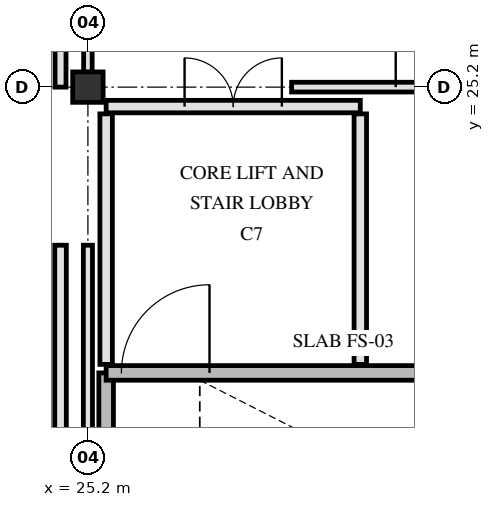
"""IFC4 building model, lengths in metres.
Left out: names, types, materials, properties, quantities, classifications, styles, units other than length and angle.
Written with IfcOpenShell. Run it as: python <this file> out.ifc"""

import sys

from ifc_helpers import new_model, si_unit, direction, frame, frame_2d, origin, origin_2d, place, context, subcontext, project, spatial, rectangle, extrude, element, fill, save


model = new_model("IFC4")
c1 = context("Model", 3, precision=1e-05, world=origin(), true_north=direction((0.0, 1.0)))
c2 = subcontext(c1, "Body", "Model", "MODEL_VIEW")
j1 = project(units=[si_unit("LENGTHUNIT", "METRE"), si_unit("PLANEANGLEUNIT", "RADIAN")], contexts=[c1])
p1 = place(None, origin())
s1 = spatial("IfcSite", under=j1, at=p1, CompositionType="ELEMENT")
p2 = place(p1, origin())
s2 = spatial("IfcBuilding", under=s1, at=p2, CompositionType="ELEMENT")
p3 = place(p2, frame((0.0, 0.0, 4.8)))
s3 = spatial("IfcBuildingStorey", under=s2, at=p3, CompositionType="ELEMENT", Elevation=4.8)
p4 = place(p3, frame((25.2, 25.2, 0.0), z_axis=(0.0, 0.0, 1.0), x_axis=(1.0, 0.0, 0.0)))
e1 = element("IfcColumn", 1, at=p4, inside=s3, PredefinedType="COLUMN", context=c2, shape_type="SweptSolid", body=[
    extrude(rectangle(XDim=0.5, YDim=0.5, at=origin_2d()), origin(), (0.0, 0.0, 1.0), 4.5),
])
p5 = place(p3, frame((25.5, 17.18, 0.0), z_axis=(0.0, 0.0, 1.0), x_axis=(0.0, 1.0, 0.0)))
e2 = element("IfcWall", 2, at=p5, inside=s3, PredefinedType="SHEAR", context=c2, shape_type="SweptSolid", body=[
    extrude(rectangle(XDim=3.32, YDim=0.24, at=frame_2d((1.66, 0.0))), origin(), (0.0, 0.0, 1.0), 4.15),
])
p6 = place(p3, frame((25.5, 20.5, 0.0), z_axis=(0.0, 0.0, 1.0), x_axis=(1.0, 0.0, 0.0)))
e3 = element("IfcWall", 3, at=p6, inside=s3, PredefinedType="SHEAR", context=c2, shape_type="SweptSolid", body=[
    extrude(rectangle(XDim=7.82, YDim=0.24, at=frame_2d((3.91, 0.0))), origin(), (0.0, 0.0, 1.0), 4.15),
])
p7 = place(p6, frame((0.25, 0.0, 0.0)))
e4 = element("IfcOpeningElement", 4, at=p7, cuts=e3, PredefinedType="OPENING", context=c2, shape_type="SweptSolid", body=[
    extrude(rectangle(XDim=1.45, YDim=2.2, at=frame_2d((0.725, 1.1))), frame((0.0, 0.13, 0.0), z_axis=(0.0, -1.0, 0.0), x_axis=(1.0, 0.0, 0.0)), (0.0, 0.0, 1.0), 0.26),
])
p8 = place(p3, frame((29.68, 20.64, 0.0), z_axis=(0.0, 0.0, 1.0), x_axis=(0.0, 1.0, 0.0)))
e5 = element("IfcWall", 5, at=p8, inside=s3, PredefinedType="PARTITIONING", context=c2, shape_type="SweptSolid", body=[
    extrude(rectangle(XDim=4.12, YDim=0.205, at=frame_2d((2.06, 0.0))), origin(), (0.0, 0.0, 1.0), 4.14),
])
p9 = place(p3, frame((25.5, 20.64, 0.0), z_axis=(0.0, 0.0, 1.0), x_axis=(0.0, 1.0, 0.0)))
e6 = element("IfcWall", 6, at=p9, inside=s3, PredefinedType="PARTITIONING", context=c2, shape_type="SweptSolid", body=[
    extrude(rectangle(XDim=4.12, YDim=0.205, at=frame_2d((2.06, 0.0))), origin(), (0.0, 0.0, 1.0), 3.59),
])
p10 = place(p3, frame((25.5, 24.88, 0.0), z_axis=(0.0, 0.0, 1.0), x_axis=(1.0, 0.0, 0.0)))
e7 = element("IfcWall", 7, at=p10, inside=s3, PredefinedType="PARTITIONING", context=c2, shape_type="SweptSolid", body=[
    extrude(rectangle(XDim=4.18, YDim=0.205, at=frame_2d((2.09, 0.0))), origin(), (0.0, 0.0, 1.0), 3.54),
])
p11 = place(p10, frame((1.29, 0.0, 0.0)))
e8 = element("IfcOpeningElement", 8, at=p11, cuts=e7, PredefinedType="OPENING", context=c2, shape_type="SweptSolid", body=[
    extrude(rectangle(XDim=1.6, YDim=2.25, at=frame_2d((0.8, 1.125))), frame((0.0, 0.113, 0.0), z_axis=(0.0, -1.0, 0.0), x_axis=(1.0, 0.0, 0.0)), (0.0, 0.0, 1.0), 0.225),
])
p12 = place(p3, frame((28.55, 25.2, 0.0), z_axis=(0.0, 0.0, 1.0), x_axis=(1.0, 0.0, 0.0)))
e9 = element("IfcWall", 9, at=p12, inside=s3, PredefinedType="PARTITIONING", context=c2, shape_type="SweptSolid", body=[
    extrude(rectangle(XDim=4.805, YDim=0.16, at=frame_2d((2.402, 0.0))), origin(), (0.0, 0.0, 1.0), 3.54),
])
p13 = place(p12, frame((1.712, 0.0, 0.0)))
e10 = element("IfcOpeningElement", 10, at=p13, cuts=e9, PredefinedType="OPENING", context=c2, shape_type="SweptSolid", body=[
    extrude(rectangle(XDim=1.38, YDim=2.22, at=frame_2d((0.69, 1.11))), frame((0.0, 0.09, 0.0), z_axis=(0.0, -1.0, 0.0), x_axis=(1.0, 0.0, 0.0)), (0.0, 0.0, 1.0), 0.18),
])
p14 = place(p3, frame((24.75, 17.465, 0.0), z_axis=(0.0, 0.0, 1.0), x_axis=(0.0, 1.0, 0.0)))
e11 = element("IfcWall", 11, at=p14, inside=s3, PredefinedType="PARTITIONING", context=c2, shape_type="SweptSolid", body=[
    extrude(rectangle(XDim=5.135, YDim=0.19, at=frame_2d((2.567, 0.0))), origin(), (0.0, 0.0, 1.0), 4.14),
])
p15 = place(p3, frame((24.75, 25.2, 0.0), z_axis=(0.0, 0.0, 1.0), x_axis=(0.0, 1.0, 0.0)))
e12 = element("IfcWall", 12, at=p15, inside=s3, PredefinedType="PARTITIONING", context=c2, shape_type="SweptSolid", body=[
    extrude(rectangle(XDim=2.335, YDim=0.18, at=frame_2d((1.167, 0.0))), origin(), (0.0, 0.0, 1.0), 3.54),
])
p16 = place(p3, frame((25.2, 17.045, 0.0), z_axis=(0.0, 0.0, 1.0), x_axis=(0.0, 1.0, 0.0)))
e13 = element("IfcWall", 13, at=p16, inside=s3, PredefinedType="PARTITIONING", context=c2, shape_type="SweptSolid", body=[
    extrude(rectangle(XDim=5.555, YDim=0.15, at=frame_2d((2.778, 0.0))), origin(), (0.0, 0.0, 1.0), 3.59),
])
p17 = place(p3, frame((25.2, 25.445, 0.0), z_axis=(0.0, 0.0, 1.0), x_axis=(0.0, 1.0, 0.0)))
e14 = element("IfcWall", 14, at=p17, inside=s3, PredefinedType="PARTITIONING", context=c2, shape_type="SweptSolid", body=[
    extrude(rectangle(XDim=7.91, YDim=0.14, at=frame_2d((3.955, 0.0))), origin(), (0.0, 0.0, 1.0), 3.59),
])
p18 = place(p7, origin())
e15 = element("IfcDoor", 15, at=p18, inside=s3, OperationType="SINGLE_SWING_RIGHT", PredefinedType="DOOR", context=c2, shape_type="SweptSolid", body=[
    extrude(rectangle(XDim=1.45, YDim=2.2, at=frame_2d((0.725, 1.1))), frame((0.0, 0.025, 0.0), z_axis=(0.0, -1.0, 0.0), x_axis=(1.0, 0.0, 0.0)), (0.0, 0.0, 1.0), 0.05),
])
fill(e4, e15)
p19 = place(p11, origin())
e16 = element("IfcDoor", 16, at=p19, inside=s3, OperationType="DOUBLE_SWING_LEFT", PredefinedType="DOOR", context=c2, shape_type="SweptSolid", body=[
    extrude(rectangle(XDim=1.6, YDim=2.25, at=frame_2d((0.8, 1.125))), frame((0.0, 0.025, 0.0), z_axis=(0.0, -1.0, 0.0), x_axis=(1.0, 0.0, 0.0)), (0.0, 0.0, 1.0), 0.05),
])
fill(e8, e16)
p20 = place(p13, origin())
e17 = element("IfcDoor", 17, at=p20, inside=s3, OperationType="SINGLE_SWING_LEFT", PredefinedType="DOOR", context=c2, shape_type="SweptSolid", body=[
    extrude(rectangle(XDim=1.38, YDim=2.22, at=frame_2d((0.69, 1.11))), frame((0.0, 0.025, 0.0), z_axis=(0.0, -1.0, 0.0), x_axis=(1.0, 0.0, 0.0)), (0.0, 0.0, 1.0), 0.05),
])
fill(e10, e17)
save(model, sys.argv[1])
